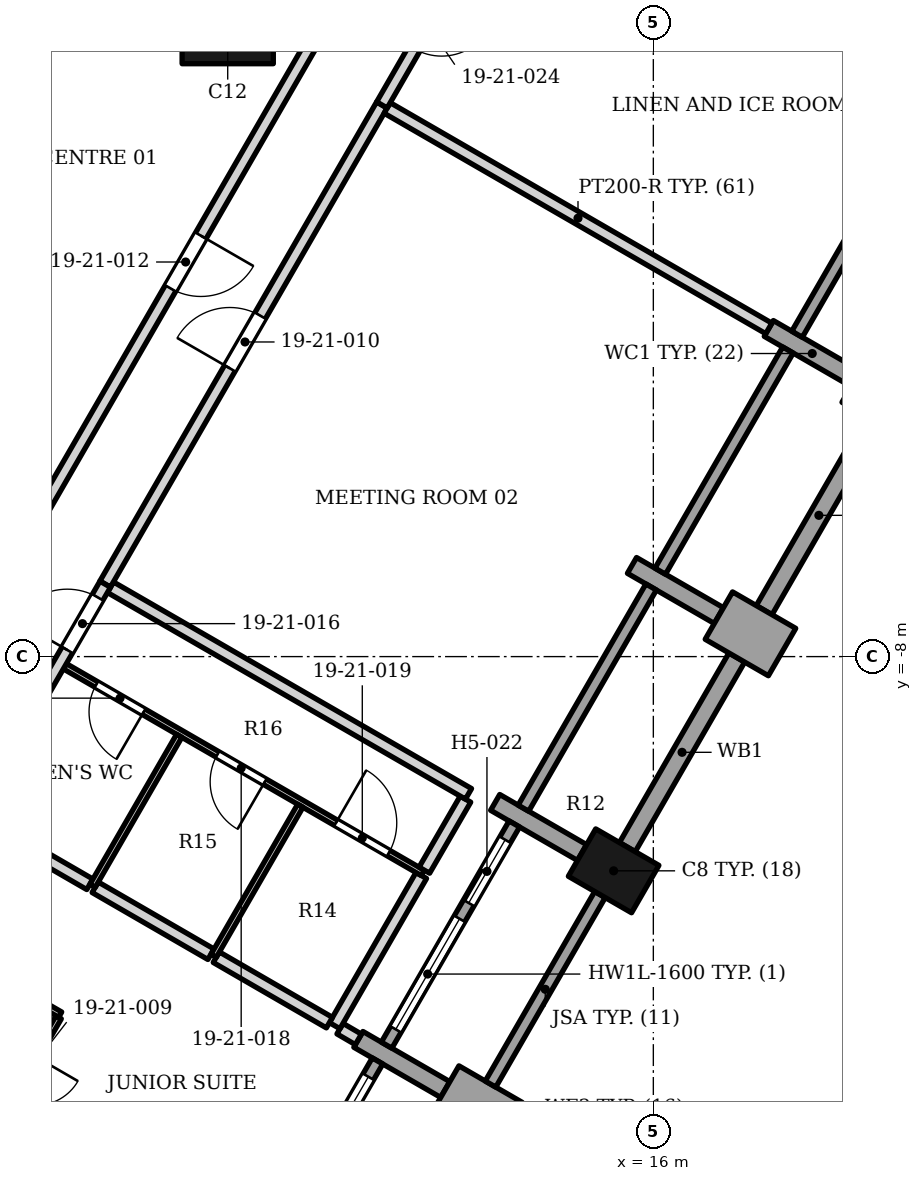
"""IFC4 building model, lengths in metres.
Left out: names, types, materials, properties, quantities, classifications, styles, units other than length and angle.
Written with IfcOpenShell. Run it as: python <this file> out.ifc"""

import sys

from ifc_helpers import new_model, si_unit, direction, frame, frame_2d, origin, origin_2d, place, context, subcontext, project, spatial, polyline, rectangle, outline, extrude, element, fill, save


model = new_model("IFC4")
c1 = context("Model", 3, precision=1e-05, world=origin(), true_north=direction((0.0, 1.0)))
c2 = subcontext(c1, "Body", "Model", "MODEL_VIEW")
j1 = project(units=[si_unit("LENGTHUNIT", "METRE"), si_unit("PLANEANGLEUNIT", "RADIAN")], contexts=[c1])
p1 = place(None, origin())
s1 = spatial("IfcSite", under=j1, at=p1, CompositionType="ELEMENT")
p2 = place(p1, origin())
s2 = spatial("IfcBuilding", under=s1, at=p2, CompositionType="ELEMENT")
p3 = place(p2, frame((0.0, 0.0, 91.8)))
s3 = spatial("IfcBuildingStorey", under=s2, at=p3, CompositionType="ELEMENT", Elevation=91.8)
p4 = place(p3, frame((9.0, 2.5, 0.0), z_axis=(0.0, 0.0, 1.0), x_axis=(1.0, 0.0, 0.0)))
e1 = element("IfcColumn", 1, at=p4, inside=s3, PredefinedType="COLUMN", context=c2, shape_type="SweptSolid", body=[
    extrude(rectangle(XDim=1.5, YDim=1.5, at=origin_2d()), origin(), (0.0, 0.0, 1.0), 3.4),
])
for number, where, z_axis, x_axis in (
    (2, (15.347, -11.523, 0.0), (0.0, 0.0, 1.0), (0.5, 0.866, 0.0)),
    (3, (19.847, -3.728, 0.0), (0.0, 0.0, 1.0), (0.5, 0.866, 0.0)),
):
    element("IfcColumn", number, at=place(p3, frame(where, z_axis=z_axis, x_axis=x_axis)), inside=s3, PredefinedType="COLUMN", context=c2, shape_type="SweptSolid", body=[
        extrude(rectangle(XDim=0.9, YDim=1.2, at=origin_2d()), origin(), (0.0, 0.0, 1.0), 3.4),
    ])
p5 = place(p3, frame((12.578, -15.12, 0.0), z_axis=(0.0, 0.0, 1.0), x_axis=(0.866006032174, -0.500033551112, 0.0)))
e4 = element("IfcWall", 4, at=p5, inside=s3, PredefinedType="SOLIDWALL", context=c2, shape_type="SweptSolid", body=[
    extrude(rectangle(XDim=1.2, YDim=0.9, at=frame_2d((0.6, 0.0))), origin(), (0.0, 0.0, 1.0), 2.63),
])
p6 = place(p3, frame((12.578, -15.12, 0.0), z_axis=(0.0, 0.0, 1.0), x_axis=(-0.866040211805, 0.499974350878, 0.0)))
e5 = element("IfcWall", 5, at=p6, inside=s3, PredefinedType="SOLIDWALL", context=c2, shape_type="SweptSolid", body=[
    extrude(rectangle(XDim=1.65, YDim=0.3, at=frame_2d((0.825, 0.0))), origin(), (0.0, 0.0, 1.0), 2.65),
])
p7 = place(p3, frame((13.399, -10.397, 0.0), z_axis=(0.0, 0.0, 1.0), x_axis=(0.866003217194, -0.500038426333, 0.0)))
e6 = element("IfcWall", 6, at=p7, inside=s3, PredefinedType="SOLIDWALL", context=c2, shape_type="SweptSolid", body=[
    extrude(rectangle(XDim=1.65, YDim=0.3, at=frame_2d((0.825, 0.0))), origin(), (0.0, 0.0, 1.0), 2.384),
])
p8 = place(p3, frame((18.117, -7.926, 0.0), z_axis=(0.0, 0.0, 1.0), x_axis=(-0.866006032174, 0.500033551112, 0.0)))
e7 = element("IfcWall", 7, at=p8, inside=s3, PredefinedType="SOLIDWALL", context=c2, shape_type="SweptSolid", body=[
    extrude(rectangle(XDim=1.2, YDim=0.9, at=frame_2d((0.6, 0.0))), origin(), (0.0, 0.0, 1.0), 2.63),
])
p9 = place(p3, frame((17.078, -7.325, 0.0), z_axis=(0.0, 0.0, 1.0), x_axis=(-0.866040211805, 0.499974350878, 0.0)))
e8 = element("IfcWall", 8, at=p9, inside=s3, PredefinedType="SOLIDWALL", context=c2, shape_type="SweptSolid", body=[
    extrude(rectangle(XDim=1.65, YDim=0.3, at=frame_2d((0.825, 0.0))), origin(), (0.0, 0.0, 1.0), 2.65),
])
p10 = place(p3, frame((19.327, -3.428, 0.0), z_axis=(0.0, 0.0, 1.0), x_axis=(-0.866030301974, 0.499991515992, 0.0)))
e9 = element("IfcWall", 9, at=p10, inside=s3, PredefinedType="SOLIDWALL", context=c2, shape_type="SweptSolid", body=[
    extrude(rectangle(XDim=1.649, YDim=0.3, at=frame_2d((0.825, 0.0))), origin(), (0.0, 0.0, 1.0), 2.65),
])
p11 = place(p3, frame((9.364, -18.287, 0.0), z_axis=(0.0, 0.0, 1.0), x_axis=(0.500027713859, 0.866009402589, 0.0)))
e10 = element("IfcWall", 10, at=p11, inside=s3, PredefinedType="ELEMENTEDWALL", context=c2, shape_type="SweptSolid", body=[
    extrude(rectangle(XDim=4.2, YDim=0.2, at=frame_2d((2.1, 0.0))), origin(), (0.0, 0.0, 1.0), 2.65),
])
p12 = place(p11, frame((0.3, 0.0, 0.6)))
e11 = element("IfcOpeningElement", 11, at=p12, cuts=e10, PredefinedType="OPENING", context=c2, shape_type="SweptSolid", body=[
    extrude(rectangle(XDim=2.1, YDim=1.8, at=frame_2d((1.05, 0.9))), frame((0.0, 0.11, 0.0), z_axis=(0.0, -1.0, 0.0), x_axis=(1.0, 0.0, 0.0)), (0.0, 0.0, 1.0), 0.22),
])
p13 = place(p11, frame((2.7, 0.0, 0.0)))
e12 = element("IfcOpeningElement", 12, at=p13, cuts=e10, PredefinedType="OPENING", context=c2, shape_type="SweptSolid", body=[
    extrude(rectangle(XDim=1.2, YDim=2.4, at=frame_2d((0.6, 1.2))), frame((0.0, 0.11, 0.0), z_axis=(0.0, -1.0, 0.0), x_axis=(1.0, 0.0, 0.0)), (0.0, 0.0, 1.0), 0.22),
])
p14 = place(p3, origin())
e13 = element("IfcWall", 13, at=p14, inside=s3, PredefinedType="SOLIDWALL", context=c2, shape_type="SweptSolid", body=[
    extrude(outline(polyline([(13.409, -15.08), (15.209, -11.963), (15.036, -11.863), (13.236, -14.98), (13.409, -15.08)])), origin(), (0.0, 0.0, 1.0), 2.63),
])
p15 = place(p3, frame((11.614, -14.39, 0.0), z_axis=(0.0, 0.0, 1.0), x_axis=(0.500027713859, 0.866009402589, 0.0)))
e14 = element("IfcWall", 14, at=p15, inside=s3, PredefinedType="ELEMENTEDWALL", context=c2, shape_type="SweptSolid", body=[
    extrude(rectangle(XDim=4.2, YDim=0.2, at=frame_2d((2.1, 0.0))), origin(), (0.0, 0.0, 1.0), 2.302),
])
p16 = place(p15, frame((0.3, 0.0, 0.6)))
e15 = element("IfcOpeningElement", 15, at=p16, cuts=e14, PredefinedType="OPENING", context=c2, shape_type="SweptSolid", body=[
    extrude(rectangle(XDim=2.1, YDim=1.6, at=frame_2d((1.05, 0.8))), frame((0.0, 0.11, 0.0), z_axis=(0.0, -1.0, 0.0), x_axis=(1.0, 0.0, 0.0)), (0.0, 0.0, 1.0), 0.22),
])
p17 = place(p15, frame((2.7, 0.0, 0.0)))
e16 = element("IfcOpeningElement", 16, at=p17, cuts=e14, PredefinedType="OPENING", context=c2, shape_type="SweptSolid", body=[
    extrude(rectangle(XDim=1.2, YDim=2.2, at=frame_2d((0.6, 1.1))), frame((0.0, 0.11, 0.0), z_axis=(0.0, -1.0, 0.0), x_axis=(1.0, 0.0, 0.0)), (0.0, 0.0, 1.0), 0.22),
])
p18 = place(p3, frame((15.573, -11.133, 0.0), z_axis=(0.0, 0.0, 1.0), x_axis=(0.500012057535, 0.866018442252, 0.0)))
e17 = element("IfcWall", 17, at=p18, inside=s3, PredefinedType="SOLIDWALL", context=c2, shape_type="SweptSolid", body=[
    extrude(rectangle(XDim=3.6, YDim=0.3, at=frame_2d((1.8, 0.0))), origin(), (0.0, 0.0, 1.0), 2.63),
])
p19 = place(p3, frame((13.864, -10.493, 0.0), z_axis=(0.0, 0.0, 1.0), x_axis=(0.500002543286, 0.866023935413, 0.0)))
e18 = element("IfcWall", 18, at=p19, inside=s3, PredefinedType="ELEMENTEDWALL", context=c2, shape_type="SweptSolid", body=[
    extrude(rectangle(XDim=4.2, YDim=0.2, at=frame_2d((2.1, 0.0))), origin(), (0.0, 0.0, 1.0), 2.65),
])
p20 = place(p3, frame((17.823, -7.236, 0.0), z_axis=(0.0, 0.0, 1.0), x_axis=(0.499982693035, 0.866035395735, 0.0)))
e19 = element("IfcWall", 19, at=p20, inside=s3, PredefinedType="SOLIDWALL", context=c2, shape_type="SweptSolid", body=[
    extrude(rectangle(XDim=3.6, YDim=0.3, at=frame_2d((1.8, 0.0))), origin(), (0.0, 0.0, 1.0), 2.63),
])
p21 = place(p3, frame((16.114, -6.595, 0.0), z_axis=(0.0, 0.0, 1.0), x_axis=(0.500027713859, 0.866009402589, 0.0)))
e20 = element("IfcWall", 20, at=p21, inside=s3, PredefinedType="ELEMENTEDWALL", context=c2, shape_type="SweptSolid", body=[
    extrude(rectangle(XDim=4.2, YDim=0.2, at=frame_2d((2.1, 0.0))), origin(), (0.0, 0.0, 1.0), 2.65),
])
p22 = place(p3, frame((18.364, -2.698, 0.0), z_axis=(0.0, 0.0, 1.0), x_axis=(0.500002543286, 0.866023935413, 0.0)))
e21 = element("IfcWall", 21, at=p22, inside=s3, PredefinedType="ELEMENTEDWALL", context=c2, shape_type="SweptSolid", body=[
    extrude(rectangle(XDim=4.2, YDim=0.2, at=frame_2d((2.1, 0.0))), origin(), (0.0, 0.0, 1.0), 2.65),
])
p23 = place(p3, frame((5.07, -15.921, 0.0), z_axis=(0.0, 0.0, 1.0), x_axis=(0.500697021662, 0.865622603967, 0.0)))
e22 = element("IfcWall", 22, at=p23, inside=s3, PredefinedType="PARTITIONING", context=c2, shape_type="SweptSolid", body=[
    extrude(rectangle(XDim=2.298, YDim=0.1, at=frame_2d((1.149, 0.0))), origin(), (0.0, 0.0, 1.0), 3.23),
])
p24 = place(p23, frame((0.748, 0.0, 0.0)))
e23 = element("IfcOpeningElement", 23, at=p24, cuts=e22, PredefinedType="OPENING", context=c2, shape_type="SweptSolid", body=[
    extrude(rectangle(XDim=0.8, YDim=2.1, at=frame_2d((0.4, 1.05))), frame((0.0, 0.06, 0.0), z_axis=(0.0, -1.0, 0.0), x_axis=(1.0, 0.0, 0.0)), (0.0, 0.0, 1.0), 0.12),
])
p25 = place(p3, frame((2.621, -14.565, 0.0), z_axis=(0.0, 0.0, 1.0), x_axis=(0.866035857012, -0.499981894041, 0.0)))
e24 = element("IfcWall", 24, at=p25, inside=s3, PredefinedType="PARTITIONING", context=c2, shape_type="SweptSolid", body=[
    extrude(rectangle(XDim=7.25, YDim=0.1, at=frame_2d((3.625, 0.0))), origin(), (0.0, 0.0, 1.0), 2.552),
])
p26 = place(p25, frame((4.65, 0.0, 0.0)))
e25 = element("IfcOpeningElement", 25, at=p26, cuts=e24, PredefinedType="OPENING", context=c2, shape_type="SweptSolid", body=[
    extrude(rectangle(XDim=0.9, YDim=2.1, at=frame_2d((0.45, 1.05))), frame((0.0, 0.06, 0.0), z_axis=(0.0, -1.0, 0.0), x_axis=(1.0, 0.0, 0.0)), (0.0, 0.0, 1.0), 0.12),
])
p27 = place(p3, frame((10.847, -14.118, 0.0), z_axis=(0.0, 0.0, 1.0), x_axis=(0.864133115814, -0.503263308968, 0.0)))
e26 = element("IfcWall", 26, at=p27, inside=s3, PredefinedType="PARTITIONING", context=c2, shape_type="SweptSolid", body=[
    extrude(rectangle(XDim=0.35, YDim=0.2, at=frame_2d((0.175, 0.0))), origin(), (0.0, 0.0, 1.0), 3.23),
])
p28 = place(p3, frame((10.759, -14.07, 0.0), z_axis=(0.0, 0.0, 1.0), x_axis=(0.499472906963, 0.866329507295, 0.0)))
e27 = element("IfcWall", 27, at=p28, inside=s3, PredefinedType="PARTITIONING", context=c2, shape_type="SweptSolid", body=[
    extrude(rectangle(XDim=2.852, YDim=0.2, at=frame_2d((1.426, 0.0))), origin(), (0.0, 0.0, 1.0), 2.302),
])
p29 = place(p3, frame((3.82, -12.49, 0.0), z_axis=(0.0, 0.0, 1.0), x_axis=(0.866326367614, -0.499478352661, 0.0)))
e28 = element("IfcWall", 28, at=p29, inside=s3, PredefinedType="PARTITIONING", context=c2, shape_type="SweptSolid", body=[
    extrude(rectangle(XDim=2.8, YDim=0.1, at=frame_2d((1.4, 0.0))), origin(), (0.0, 0.0, 1.0), 2.552),
])
p30 = place(p3, frame((8.812, -12.943, 0.0), z_axis=(0.0, 0.0, 1.0), x_axis=(0.86565946566, -0.500633288458, 0.0)))
e29 = element("IfcWall", 29, at=p30, inside=s3, PredefinedType="PARTITIONING", context=c2, shape_type="SweptSolid", body=[
    extrude(rectangle(XDim=2.15, YDim=0.2, at=frame_2d((1.075, 0.0))), origin(), (0.0, 0.0, 1.0), 2.782),
])
p31 = place(p3, frame((6.82, -11.793, 0.0), z_axis=(0.0, 0.0, 1.0), x_axis=(0.865656676501, -0.500638111243, 0.0)))
e30 = element("IfcWall", 30, at=p31, inside=s3, PredefinedType="PARTITIONING", context=c2, shape_type="SweptSolid", body=[
    extrude(rectangle(XDim=2.2, YDim=0.2, at=frame_2d((1.1, 0.0))), origin(), (0.0, 0.0, 1.0), 2.302),
])
p32 = place(p3, frame((6.322, -8.159, 0.0), z_axis=(0.0, 0.0, 1.0), x_axis=(0.866028893315, -0.499993955907, 0.0)))
e31 = element("IfcWall", 31, at=p32, inside=s3, PredefinedType="PARTITIONING", context=c2, shape_type="SweptSolid", body=[
    extrude(rectangle(XDim=6.798, YDim=0.1, at=frame_2d((3.399, 0.0))), origin(), (0.0, 0.0, 1.0), 2.552),
])
p33 = place(p32, frame((0.598, 0.0, 0.0)))
e32 = element("IfcOpeningElement", 32, at=p33, cuts=e31, PredefinedType="OPENING", context=c2, shape_type="SweptSolid", body=[
    extrude(rectangle(XDim=0.9, YDim=2.1, at=frame_2d((0.45, 1.05))), frame((0.0, 0.06, 0.0), z_axis=(0.0, -1.0, 0.0), x_axis=(1.0, 0.0, 0.0)), (0.0, 0.0, 1.0), 0.12),
])
p34 = place(p32, frame((2.898, 0.0, 0.0)))
e33 = element("IfcOpeningElement", 33, at=p34, cuts=e31, PredefinedType="OPENING", context=c2, shape_type="SweptSolid", body=[
    extrude(rectangle(XDim=0.9, YDim=2.1, at=frame_2d((0.45, 1.05))), frame((0.0, 0.06, 0.0), z_axis=(0.0, -1.0, 0.0), x_axis=(1.0, 0.0, 0.0)), (0.0, 0.0, 1.0), 0.12),
])
p35 = place(p32, frame((5.148, 0.0, 0.0)))
e34 = element("IfcOpeningElement", 34, at=p35, cuts=e31, PredefinedType="OPENING", context=c2, shape_type="SweptSolid", body=[
    extrude(rectangle(XDim=1.0, YDim=2.1, at=frame_2d((0.5, 1.05))), frame((0.0, 0.06, 0.0), z_axis=(0.0, -1.0, 0.0), x_axis=(1.0, 0.0, 0.0)), (0.0, 0.0, 1.0), 0.12),
])
p36 = place(p3, frame((12.234, -11.512, 0.0), z_axis=(0.0, 0.0, 1.0), x_axis=(0.501000622125, 0.865446923058, 0.0)))
e35 = element("IfcWall", 35, at=p36, inside=s3, PredefinedType="PARTITIONING", context=c2, shape_type="SweptSolid", body=[
    extrude(rectangle(XDim=1.35, YDim=0.2, at=frame_2d((0.675, 0.0))), origin(), (0.0, 0.0, 1.0), 3.23),
])
p37 = place(p3, frame((4.873, -10.669, 0.0), z_axis=(0.0, 0.0, 1.0), x_axis=(0.865664803183, -0.500624059081, 0.0)))
e36 = element("IfcWall", 36, at=p37, inside=s3, PredefinedType="PARTITIONING", context=c2, shape_type="SweptSolid", body=[
    extrude(rectangle(XDim=2.148, YDim=0.2, at=frame_2d((1.074, 0.0))), origin(), (0.0, 0.0, 1.0), 3.23),
])
p38 = place(p3, frame((8.769, -12.92, 0.0), z_axis=(0.0, 0.0, 1.0), x_axis=(0.499972122318, 0.866041498374, 0.0)))
e37 = element("IfcWall", 37, at=p38, inside=s3, PredefinedType="PARTITIONING", context=c2, shape_type="SweptSolid", body=[
    extrude(rectangle(XDim=2.85, YDim=0.1, at=frame_2d((1.425, 0.0))), origin(), (0.0, 0.0, 1.0), 2.302),
])
p39 = place(p3, frame((7.072, -6.86, 0.0), z_axis=(0.0, 0.0, 1.0), x_axis=(0.86615808173, -0.499770124611, 0.0)))
e38 = element("IfcWall", 38, at=p39, inside=s3, PredefinedType="PARTITIONING", context=c2, shape_type="SweptSolid", body=[
    extrude(rectangle(XDim=6.798, YDim=0.2, at=frame_2d((3.399, 0.0))), origin(), (0.0, 0.0, 1.0), 2.552),
])
p40 = place(p3, frame((3.379, -10.049, 0.0), z_axis=(0.0, 0.0, 1.0), x_axis=(0.50000242408, 0.866024004237, 0.0)))
e39 = element("IfcWall", 39, at=p40, inside=s3, PredefinedType="PARTITIONING", context=c2, shape_type="SweptSolid", body=[
    extrude(rectangle(XDim=15.877, YDim=0.2, at=frame_2d((7.938, 0.0))), origin(), (0.0, 0.0, 1.0), 2.384),
])
p41 = place(p40, frame((9.359, 0.0, 0.0)))
e40 = element("IfcOpeningElement", 40, at=p41, cuts=e39, PredefinedType="OPENING", context=c2, shape_type="SweptSolid", body=[
    extrude(rectangle(XDim=1.0, YDim=2.1, at=frame_2d((0.5, 1.05))), frame((0.0, 0.11, 0.0), z_axis=(0.0, -1.0, 0.0), x_axis=(1.0, 0.0, 0.0)), (0.0, 0.0, 1.0), 0.22),
])
p42 = place(p3, frame((6.777, -11.771, 0.0), z_axis=(0.0, 0.0, 1.0), x_axis=(0.499972122318, 0.866041498374, 0.0)))
e41 = element("IfcWall", 41, at=p42, inside=s3, PredefinedType="PARTITIONING", context=c2, shape_type="SweptSolid", body=[
    extrude(rectangle(XDim=2.85, YDim=0.1, at=frame_2d((1.425, 0.0))), origin(), (0.0, 0.0, 1.0), 3.23),
])
p43 = place(p3, frame((6.985, -6.807, 0.0), z_axis=(0.0, 0.0, 1.0), x_axis=(0.500170742348, 0.865926803199, 0.0)))
e42 = element("IfcWall", 42, at=p43, inside=s3, PredefinedType="PARTITIONING", context=c2, shape_type="SweptSolid", body=[
    extrude(rectangle(XDim=9.098, YDim=0.2, at=frame_2d((4.549, 0.0))), origin(), (0.0, 0.0, 1.0), 2.552),
])
p44 = place(p43, frame((4.098, 0.0, 0.0)))
e43 = element("IfcOpeningElement", 43, at=p44, cuts=e42, PredefinedType="OPENING", context=c2, shape_type="SweptSolid", body=[
    extrude(rectangle(XDim=1.0, YDim=2.1, at=frame_2d((0.5, 1.05))), frame((0.0, 0.11, 0.0), z_axis=(0.0, -1.0, 0.0), x_axis=(1.0, 0.0, 0.0)), (0.0, 0.0, 1.0), 0.22),
])
p45 = place(p3, frame((4.786, -10.619, 0.0), z_axis=(0.0, 0.0, 1.0), x_axis=(0.500007539231, 0.866021050964, 0.0)))
e44 = element("IfcWall", 44, at=p45, inside=s3, PredefinedType="PARTITIONING", context=c2, shape_type="SweptSolid", body=[
    extrude(rectangle(XDim=4.398, YDim=0.2, at=frame_2d((2.199, 0.0))), origin(), (0.0, 0.0, 1.0), 3.23),
])
p46 = place(p45, frame((3.15, 0.0, 0.0)))
e45 = element("IfcOpeningElement", 45, at=p46, cuts=e44, PredefinedType="OPENING", context=c2, shape_type="SweptSolid", body=[
    extrude(rectangle(XDim=1.0, YDim=2.1, at=frame_2d((0.5, 1.05))), frame((0.0, 0.11, 0.0), z_axis=(0.0, -1.0, 0.0), x_axis=(1.0, 0.0, 0.0)), (0.0, 0.0, 1.0), 0.22),
])
p47 = place(p3, frame((11.623, 1.022, 0.0), z_axis=(0.0, 0.0, 1.0), x_axis=(0.865930886033, -0.500163673825, 0.0)))
e46 = element("IfcWall", 46, at=p47, inside=s3, PredefinedType="PARTITIONING", context=c2, shape_type="SweptSolid", body=[
    extrude(rectangle(XDim=7.248, YDim=0.2, at=frame_2d((3.624, 0.0))), origin(), (0.0, 0.0, 1.0), 2.384),
])
p48 = place(p3, frame((11.536, 1.073, 0.0), z_axis=(0.0, 0.0, 1.0), x_axis=(0.499620231516, 0.866244552225, 0.0)))
e47 = element("IfcWall", 47, at=p48, inside=s3, PredefinedType="PARTITIONING", context=c2, shape_type="SweptSolid", body=[
    extrude(rectangle(XDim=3.032, YDim=0.2, at=frame_2d((1.516, 0.0))), origin(), (0.0, 0.0, 1.0), 3.23),
])
p49 = place(p48, frame((1.066, 0.0, 0.0)))
e48 = element("IfcOpeningElement", 48, at=p49, cuts=e47, PredefinedType="OPENING", context=c2, shape_type="SweptSolid", body=[
    extrude(rectangle(XDim=0.9, YDim=2.1, at=frame_2d((0.45, 1.05))), frame((0.0, 0.11, 0.0), z_axis=(0.0, -1.0, 0.0), x_axis=(1.0, 0.0, 0.0)), (0.0, 0.0, 1.0), 0.22),
])
p50 = place(p13, origin())
e49 = element("IfcDoor", 49, at=p50, inside=s3, OperationType="SINGLE_SWING_LEFT", PredefinedType="DOOR", context=c2, shape_type="SweptSolid", body=[
    extrude(rectangle(XDim=1.2, YDim=2.4, at=frame_2d((0.6, 1.2))), frame((0.0, 0.025, 0.0), z_axis=(0.0, -1.0, 0.0), x_axis=(1.0, 0.0, 0.0)), (0.0, 0.0, 1.0), 0.05),
])
fill(e12, e49)
p51 = place(p16, origin())
e50 = element("IfcWindow", 50, at=p51, inside=s3, PartitioningType="SINGLE_PANEL", PredefinedType="WINDOW", context=c2, shape_type="SweptSolid", body=[
    extrude(rectangle(XDim=2.1, YDim=1.6, at=frame_2d((1.05, 0.8))), frame((0.0, 0.03, 0.0), z_axis=(0.0, -1.0, 0.0), x_axis=(1.0, 0.0, 0.0)), (0.0, 0.0, 1.0), 0.06),
])
fill(e15, e50)
p52 = place(p17, origin())
e51 = element("IfcDoor", 51, at=p52, inside=s3, OperationType="SINGLE_SWING_LEFT", PredefinedType="DOOR", context=c2, shape_type="SweptSolid", body=[
    extrude(rectangle(XDim=1.2, YDim=2.2, at=frame_2d((0.6, 1.1))), frame((0.0, 0.025, 0.0), z_axis=(0.0, -1.0, 0.0), x_axis=(1.0, 0.0, 0.0)), (0.0, 0.0, 1.0), 0.05),
])
fill(e16, e51)
p53 = place(p44, origin())
e52 = element("IfcDoor", 52, at=p53, inside=s3, OperationType="SINGLE_SWING_LEFT", PredefinedType="DOOR", context=c2, shape_type="SweptSolid", body=[
    extrude(rectangle(XDim=1.0, YDim=2.1, at=frame_2d((0.5, 1.05))), frame((0.0, 0.025, 0.0), z_axis=(0.0, -1.0, 0.0), x_axis=(1.0, 0.0, 0.0)), (0.0, 0.0, 1.0), 0.05),
])
fill(e43, e52)
p54 = place(p41, origin())
e53 = element("IfcDoor", 53, at=p54, inside=s3, OperationType="SINGLE_SWING_RIGHT", PredefinedType="DOOR", context=c2, shape_type="SweptSolid", body=[
    extrude(rectangle(XDim=1.0, YDim=2.1, at=frame_2d((0.5, 1.05))), frame((0.0, 0.025, 0.0), z_axis=(0.0, -1.0, 0.0), x_axis=(1.0, 0.0, 0.0)), (0.0, 0.0, 1.0), 0.05),
])
fill(e40, e53)
p55 = place(p46, origin())
e54 = element("IfcDoor", 54, at=p55, inside=s3, OperationType="SINGLE_SWING_LEFT", PredefinedType="DOOR", context=c2, shape_type="SweptSolid", body=[
    extrude(rectangle(XDim=1.0, YDim=2.1, at=frame_2d((0.5, 1.05))), frame((0.0, 0.025, 0.0), z_axis=(0.0, -1.0, 0.0), x_axis=(1.0, 0.0, 0.0)), (0.0, 0.0, 1.0), 0.05),
])
fill(e45, e54)
p56 = place(p33, origin())
e55 = element("IfcDoor", 55, at=p56, inside=s3, OperationType="SINGLE_SWING_RIGHT", PredefinedType="DOOR", context=c2, shape_type="SweptSolid", body=[
    extrude(rectangle(XDim=0.9, YDim=2.1, at=frame_2d((0.45, 1.05))), frame((0.0, 0.025, 0.0), z_axis=(0.0, -1.0, 0.0), x_axis=(1.0, 0.0, 0.0)), (0.0, 0.0, 1.0), 0.05),
])
fill(e32, e55)
p57 = place(p34, origin())
e56 = element("IfcDoor", 56, at=p57, inside=s3, OperationType="SINGLE_SWING_RIGHT", PredefinedType="DOOR", context=c2, shape_type="SweptSolid", body=[
    extrude(rectangle(XDim=0.9, YDim=2.1, at=frame_2d((0.45, 1.05))), frame((0.0, 0.025, 0.0), z_axis=(0.0, -1.0, 0.0), x_axis=(1.0, 0.0, 0.0)), (0.0, 0.0, 1.0), 0.05),
])
fill(e33, e56)
p58 = place(p35, origin())
e57 = element("IfcDoor", 57, at=p58, inside=s3, OperationType="SINGLE_SWING_LEFT", PredefinedType="DOOR", context=c2, shape_type="SweptSolid", body=[
    extrude(rectangle(XDim=1.0, YDim=2.1, at=frame_2d((0.5, 1.05))), frame((0.0, 0.025, 0.0), z_axis=(0.0, -1.0, 0.0), x_axis=(1.0, 0.0, 0.0)), (0.0, 0.0, 1.0), 0.05),
])
fill(e34, e57)
save(model, sys.argv[1])
